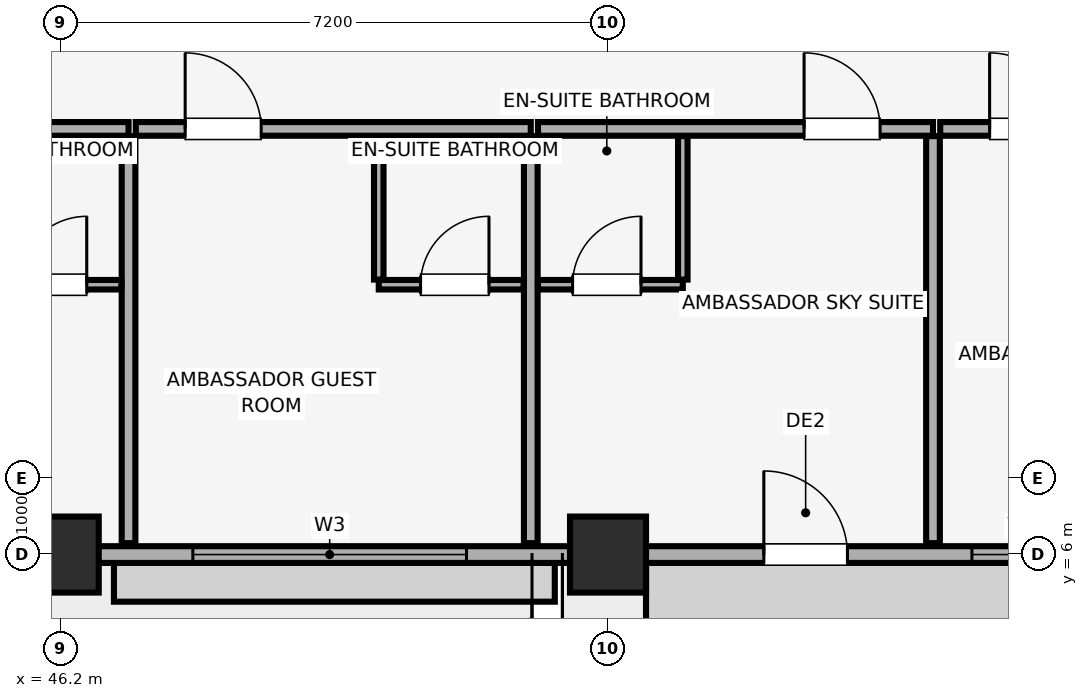
"""IFC4 building model, lengths in metres.
Left out: names, types, materials, properties, quantities, classifications, styles, units other than length and angle.
Written with IfcOpenShell. Run it as: python <this file> out.ifc"""

import sys

from ifc_helpers import new_model, si_unit, direction, frame, frame_2d, origin, origin_2d, place, context, subcontext, project, spatial, rectangle, extrude, element, fill, save


model = new_model("IFC4")
c1 = context("Model", 3, precision=1e-05, world=origin(), true_north=direction((0.0, 1.0)))
c2 = subcontext(c1, "Body", "Model", "MODEL_VIEW")
j1 = project(units=[si_unit("LENGTHUNIT", "METRE"), si_unit("PLANEANGLEUNIT", "RADIAN")], contexts=[c1])
p1 = place(None, origin())
s1 = spatial("IfcSite", under=j1, at=p1, CompositionType="ELEMENT")
p2 = place(p1, origin())
s2 = spatial("IfcBuilding", under=s1, at=p2, CompositionType="ELEMENT")
p3 = place(p2, frame((0.0, 0.0, 229.15)))
s3 = spatial("IfcBuildingStorey", under=s2, at=p3, CompositionType="ELEMENT", Elevation=229.15)
for number, where, z_axis, x_axis in (
    (1, (46.2, 6.0, 0.0), (0.0, 0.0, 1.0), (1.0, 0.0, 0.0)),
    (2, (53.4, 6.0, 0.0), (0.0, 0.0, 1.0), (1.0, 0.0, 0.0)),
):
    element("IfcColumn", number, at=place(p3, frame(where, z_axis=z_axis, x_axis=x_axis)), inside=s3, PredefinedType="COLUMN", context=c2, shape_type="SweptSolid", body=[
        extrude(rectangle(XDim=1.0, YDim=1.0, at=origin_2d()), origin(), (0.0, 0.0, 1.0), 3.71),
    ])
p4 = place(p3, frame((9.8, 6.0, 0.0), z_axis=(0.0, 0.0, 1.0), x_axis=(1.0, 0.0, 0.0)))
e3 = element("IfcWall", 3, at=p4, inside=s3, PredefinedType="SOLIDWALL", context=c2, shape_type="SweptSolid", body=[
    extrude(rectangle(XDim=64.4, YDim=0.22, at=frame_2d((32.2, 0.0))), origin(), (0.0, 0.0, 1.0), 2.91),
])
p5 = place(p4, frame((3.25, 0.0, 0.0)))
e4 = element("IfcOpeningElement", 4, at=p5, cuts=e3, PredefinedType="OPENING", context=c2, shape_type="SweptSolid", body=[
    extrude(rectangle(XDim=1.1, YDim=2.15, at=frame_2d((0.55, 1.075))), frame((0.0, 0.12, 0.0), z_axis=(0.0, -1.0, 0.0), x_axis=(1.0, 0.0, 0.0)), (0.0, 0.0, 1.0), 0.24),
])
p6 = place(p4, frame((24.45, 0.0, 0.0)))
e5 = element("IfcOpeningElement", 5, at=p6, cuts=e3, PredefinedType="OPENING", context=c2, shape_type="SweptSolid", body=[
    extrude(rectangle(XDim=1.1, YDim=2.15, at=frame_2d((0.55, 1.075))), frame((0.0, 0.12, 0.0), z_axis=(0.0, -1.0, 0.0), x_axis=(1.0, 0.0, 0.0)), (0.0, 0.0, 1.0), 0.24),
])
p7 = place(p4, frame((45.65, 0.0, 0.0)))
e6 = element("IfcOpeningElement", 6, at=p7, cuts=e3, PredefinedType="OPENING", context=c2, shape_type="SweptSolid", body=[
    extrude(rectangle(XDim=1.1, YDim=2.15, at=frame_2d((0.55, 1.075))), frame((0.0, 0.12, 0.0), z_axis=(0.0, -1.0, 0.0), x_axis=(1.0, 0.0, 0.0)), (0.0, 0.0, 1.0), 0.24),
])
p8 = place(p4, frame((0.825, 0.0, 0.85)))
e7 = element("IfcOpeningElement", 7, at=p8, cuts=e3, PredefinedType="OPENING", context=c2, shape_type="SweptSolid", body=[
    extrude(rectangle(XDim=1.5, YDim=1.4, at=frame_2d((0.75, 0.7))), frame((0.0, 0.12, 0.0), z_axis=(0.0, -1.0, 0.0), x_axis=(1.0, 0.0, 0.0)), (0.0, 0.0, 1.0), 0.24),
])
p9 = place(p4, frame((7.217, 0.0, 0.85)))
e8 = element("IfcOpeningElement", 8, at=p9, cuts=e3, PredefinedType="OPENING", context=c2, shape_type="SweptSolid", body=[
    extrude(rectangle(XDim=3.2, YDim=1.85, at=frame_2d((1.6, 0.925))), frame((0.0, 0.12, 0.0), z_axis=(0.0, -1.0, 0.0), x_axis=(1.0, 0.0, 0.0)), (0.0, 0.0, 1.0), 0.24),
])
p10 = place(p4, frame((11.267, 0.0, 0.85)))
e9 = element("IfcOpeningElement", 9, at=p10, cuts=e3, PredefinedType="OPENING", context=c2, shape_type="SweptSolid", body=[
    extrude(rectangle(XDim=1.5, YDim=1.4, at=frame_2d((0.75, 0.7))), frame((0.0, 0.12, 0.0), z_axis=(0.0, -1.0, 0.0), x_axis=(1.0, 0.0, 0.0)), (0.0, 0.0, 1.0), 0.24),
])
p11 = place(p4, frame((16.663, 0.0, 0.85)))
e10 = element("IfcOpeningElement", 10, at=p11, cuts=e3, PredefinedType="OPENING", context=c2, shape_type="SweptSolid", body=[
    extrude(rectangle(XDim=3.2, YDim=1.85, at=frame_2d((1.6, 0.925))), frame((0.0, 0.12, 0.0), z_axis=(0.0, -1.0, 0.0), x_axis=(1.0, 0.0, 0.0)), (0.0, 0.0, 1.0), 0.24),
])
p12 = place(p4, frame((22.098, 0.0, 0.85)))
e11 = element("IfcOpeningElement", 11, at=p12, cuts=e3, PredefinedType="OPENING", context=c2, shape_type="SweptSolid", body=[
    extrude(rectangle(XDim=1.5, YDim=1.4, at=frame_2d((0.75, 0.7))), frame((0.0, 0.12, 0.0), z_axis=(0.0, -1.0, 0.0), x_axis=(1.0, 0.0, 0.0)), (0.0, 0.0, 1.0), 0.24),
])
p13 = place(p4, frame((29.0, 0.0, 0.85)))
e12 = element("IfcOpeningElement", 12, at=p13, cuts=e3, PredefinedType="OPENING", context=c2, shape_type="SweptSolid", body=[
    extrude(rectangle(XDim=2.4, YDim=1.5, at=frame_2d((1.2, 0.75))), frame((0.0, 0.12, 0.0), z_axis=(0.0, -1.0, 0.0), x_axis=(1.0, 0.0, 0.0)), (0.0, 0.0, 1.0), 0.24),
])
p14 = place(p4, frame((32.4, 0.0, 0.85)))
e13 = element("IfcOpeningElement", 13, at=p14, cuts=e3, PredefinedType="OPENING", context=c2, shape_type="SweptSolid", body=[
    extrude(rectangle(XDim=3.2, YDim=1.85, at=frame_2d((1.6, 0.925))), frame((0.0, 0.12, 0.0), z_axis=(0.0, -1.0, 0.0), x_axis=(1.0, 0.0, 0.0)), (0.0, 0.0, 1.0), 0.24),
])
p15 = place(p4, frame((38.138, 0.0, 0.85)))
e14 = element("IfcOpeningElement", 14, at=p15, cuts=e3, PredefinedType="OPENING", context=c2, shape_type="SweptSolid", body=[
    extrude(rectangle(XDim=3.6, YDim=1.75, at=frame_2d((1.8, 0.875))), frame((0.0, 0.12, 0.0), z_axis=(0.0, -1.0, 0.0), x_axis=(1.0, 0.0, 0.0)), (0.0, 0.0, 1.0), 0.24),
])
p16 = place(p4, frame((48.387, 0.0, 0.85)))
e15 = element("IfcOpeningElement", 15, at=p16, cuts=e3, PredefinedType="OPENING", context=c2, shape_type="SweptSolid", body=[
    extrude(rectangle(XDim=1.5, YDim=1.4, at=frame_2d((0.75, 0.7))), frame((0.0, 0.12, 0.0), z_axis=(0.0, -1.0, 0.0), x_axis=(1.0, 0.0, 0.0)), (0.0, 0.0, 1.0), 0.24),
])
p17 = place(p4, frame((53.583, 0.0, 0.85)))
e16 = element("IfcOpeningElement", 16, at=p17, cuts=e3, PredefinedType="OPENING", context=c2, shape_type="SweptSolid", body=[
    extrude(rectangle(XDim=3.6, YDim=1.75, at=frame_2d((1.8, 0.875))), frame((0.0, 0.12, 0.0), z_axis=(0.0, -1.0, 0.0), x_axis=(1.0, 0.0, 0.0)), (0.0, 0.0, 1.0), 0.24),
])
p18 = place(p4, frame((59.695, 0.0, 0.85)))
e17 = element("IfcOpeningElement", 17, at=p18, cuts=e3, PredefinedType="OPENING", context=c2, shape_type="SweptSolid", body=[
    extrude(rectangle(XDim=3.6, YDim=1.75, at=frame_2d((1.8, 0.875))), frame((0.0, 0.12, 0.0), z_axis=(0.0, -1.0, 0.0), x_axis=(1.0, 0.0, 0.0)), (0.0, 0.0, 1.0), 0.24),
])
p19 = place(p3, frame((41.895, 11.6, 0.0), z_axis=(0.0, 0.0, 1.0), x_axis=(1.0, 0.0, 0.0)))
e18 = element("IfcWall", 18, at=p19, inside=s3, PredefinedType="PARTITIONING", context=c2, shape_type="SweptSolid", body=[
    extrude(rectangle(XDim=5.197, YDim=0.18, at=frame_2d((2.598, 0.0))), origin(), (0.0, 0.0, 1.0), 3.71),
])
p20 = place(p19, frame((0.65, 0.0, 0.0)))
e19 = element("IfcOpeningElement", 19, at=p20, cuts=e18, PredefinedType="OPENING", context=c2, shape_type="SweptSolid", body=[
    extrude(rectangle(XDim=1.0, YDim=2.15, at=frame_2d((0.5, 1.075))), frame((0.0, 0.1, 0.0), z_axis=(0.0, -1.0, 0.0), x_axis=(1.0, 0.0, 0.0)), (0.0, 0.0, 1.0), 0.2),
])
p21 = place(p3, frame((47.092, 6.15, 0.0), z_axis=(0.0, 0.0, 1.0), x_axis=(0.0, 1.0, 0.0)))
e20 = element("IfcWall", 20, at=p21, inside=s3, PredefinedType="PARTITIONING", context=c2, shape_type="SweptSolid", body=[
    extrude(rectangle(XDim=5.355, YDim=0.18, at=frame_2d((2.677, 0.0))), origin(), (0.0, 0.0, 1.0), 3.71),
])
p22 = place(p3, frame((45.092, 9.55, 0.0), z_axis=(0.0, 0.0, 1.0), x_axis=(1.0, 0.0, 0.0)))
e21 = element("IfcWall", 21, at=p22, inside=s3, PredefinedType="PARTITIONING", context=c2, shape_type="SweptSolid", body=[
    extrude(rectangle(XDim=1.905, YDim=0.125, at=frame_2d((0.953, 0.0))), origin(), (0.0, 0.0, 1.0), 3.71),
])
p23 = place(p22, frame((0.55, 0.0, 0.0)))
e22 = element("IfcOpeningElement", 22, at=p23, cuts=e21, PredefinedType="OPENING", context=c2, shape_type="SweptSolid", body=[
    extrude(rectangle(XDim=0.9, YDim=2.1, at=frame_2d((0.45, 1.05))), frame((0.0, 0.073, 0.0), z_axis=(0.0, -1.0, 0.0), x_axis=(1.0, 0.0, 0.0)), (0.0, 0.0, 1.0), 0.145),
])
p24 = place(p3, frame((47.187, 11.6, 0.0), z_axis=(0.0, 0.0, 1.0), x_axis=(1.0, 0.0, 0.0)))
e23 = element("IfcWall", 23, at=p24, inside=s3, PredefinedType="PARTITIONING", context=c2, shape_type="SweptSolid", body=[
    extrude(rectangle(XDim=5.197, YDim=0.18, at=frame_2d((2.598, 0.0))), origin(), (0.0, 0.0, 1.0), 3.71),
])
p25 = place(p24, frame((0.65, 0.0, 0.0)))
e24 = element("IfcOpeningElement", 24, at=p25, cuts=e23, PredefinedType="OPENING", context=c2, shape_type="SweptSolid", body=[
    extrude(rectangle(XDim=1.0, YDim=2.15, at=frame_2d((0.5, 1.075))), frame((0.0, 0.1, 0.0), z_axis=(0.0, -1.0, 0.0), x_axis=(1.0, 0.0, 0.0)), (0.0, 0.0, 1.0), 0.2),
])
p26 = place(p3, frame((52.384, 6.15, 0.0), z_axis=(0.0, 0.0, 1.0), x_axis=(0.0, 1.0, 0.0)))
e25 = element("IfcWall", 25, at=p26, inside=s3, PredefinedType="PARTITIONING", context=c2, shape_type="SweptSolid", body=[
    extrude(rectangle(XDim=5.355, YDim=0.18, at=frame_2d((2.677, 0.0))), origin(), (0.0, 0.0, 1.0), 3.71),
])
p27 = place(p3, frame((50.384, 9.55, 0.0), z_axis=(0.0, 0.0, 1.0), x_axis=(1.0, 0.0, 0.0)))
e26 = element("IfcWall", 26, at=p27, inside=s3, PredefinedType="PARTITIONING", context=c2, shape_type="SweptSolid", body=[
    extrude(rectangle(XDim=1.905, YDim=0.125, at=frame_2d((0.953, 0.0))), origin(), (0.0, 0.0, 1.0), 3.71),
])
p28 = place(p27, frame((0.55, 0.0, 0.0)))
e27 = element("IfcOpeningElement", 27, at=p28, cuts=e26, PredefinedType="OPENING", context=c2, shape_type="SweptSolid", body=[
    extrude(rectangle(XDim=0.9, YDim=2.1, at=frame_2d((0.45, 1.05))), frame((0.0, 0.073, 0.0), z_axis=(0.0, -1.0, 0.0), x_axis=(1.0, 0.0, 0.0)), (0.0, 0.0, 1.0), 0.145),
])
p29 = place(p3, frame((50.384, 9.617, 0.0), z_axis=(0.0, 0.0, 1.0), x_axis=(0.0, 1.0, 0.0)))
e28 = element("IfcWall", 28, at=p29, inside=s3, PredefinedType="PARTITIONING", context=c2, shape_type="SweptSolid", body=[
    extrude(rectangle(XDim=1.887, YDim=0.125, at=frame_2d((0.944, 0.0))), origin(), (0.0, 0.0, 1.0), 3.71),
])
p30 = place(p3, frame((52.479, 11.6, 0.0), z_axis=(0.0, 0.0, 1.0), x_axis=(1.0, 0.0, 0.0)))
e29 = element("IfcWall", 29, at=p30, inside=s3, PredefinedType="PARTITIONING", context=c2, shape_type="SweptSolid", body=[
    extrude(rectangle(XDim=5.197, YDim=0.18, at=frame_2d((2.598, 0.0))), origin(), (0.0, 0.0, 1.0), 3.71),
])
p31 = place(p30, frame((3.501, 0.0, 0.0)))
e30 = element("IfcOpeningElement", 30, at=p31, cuts=e29, PredefinedType="OPENING", context=c2, shape_type="SweptSolid", body=[
    extrude(rectangle(XDim=1.0, YDim=2.15, at=frame_2d((0.5, 1.075))), frame((0.0, 0.1, 0.0), z_axis=(0.0, -1.0, 0.0), x_axis=(1.0, 0.0, 0.0)), (0.0, 0.0, 1.0), 0.2),
])
p32 = place(p3, frame((57.676, 6.15, 0.0), z_axis=(0.0, 0.0, 1.0), x_axis=(0.0, 1.0, 0.0)))
e31 = element("IfcWall", 31, at=p32, inside=s3, PredefinedType="PARTITIONING", context=c2, shape_type="SweptSolid", body=[
    extrude(rectangle(XDim=5.355, YDim=0.18, at=frame_2d((2.677, 0.0))), origin(), (0.0, 0.0, 1.0), 3.71),
])
p33 = place(p3, frame((52.479, 9.55, 0.0), z_axis=(0.0, 0.0, 1.0), x_axis=(1.0, 0.0, 0.0)))
e32 = element("IfcWall", 32, at=p33, inside=s3, PredefinedType="PARTITIONING", context=c2, shape_type="SweptSolid", body=[
    extrude(rectangle(XDim=1.905, YDim=0.125, at=frame_2d((0.953, 0.0))), origin(), (0.0, 0.0, 1.0), 3.71),
])
p34 = place(p33, frame((0.455, 0.0, 0.0)))
e33 = element("IfcOpeningElement", 33, at=p34, cuts=e32, PredefinedType="OPENING", context=c2, shape_type="SweptSolid", body=[
    extrude(rectangle(XDim=0.9, YDim=2.1, at=frame_2d((0.45, 1.05))), frame((0.0, 0.073, 0.0), z_axis=(0.0, -1.0, 0.0), x_axis=(1.0, 0.0, 0.0)), (0.0, 0.0, 1.0), 0.145),
])
p35 = place(p3, frame((54.384, 9.617, 0.0), z_axis=(0.0, 0.0, 1.0), x_axis=(0.0, 1.0, 0.0)))
e34 = element("IfcWall", 34, at=p35, inside=s3, PredefinedType="PARTITIONING", context=c2, shape_type="SweptSolid", body=[
    extrude(rectangle(XDim=1.887, YDim=0.125, at=frame_2d((0.944, 0.0))), origin(), (0.0, 0.0, 1.0), 3.71),
])
p36 = place(p3, frame((57.771, 11.6, 0.0), z_axis=(0.0, 0.0, 1.0), x_axis=(1.0, 0.0, 0.0)))
e35 = element("IfcWall", 35, at=p36, inside=s3, PredefinedType="PARTITIONING", context=c2, shape_type="SweptSolid", body=[
    extrude(rectangle(XDim=5.197, YDim=0.18, at=frame_2d((2.598, 0.0))), origin(), (0.0, 0.0, 1.0), 3.71),
])
p37 = place(p36, frame((0.65, 0.0, 0.0)))
e36 = element("IfcOpeningElement", 36, at=p37, cuts=e35, PredefinedType="OPENING", context=c2, shape_type="SweptSolid", body=[
    extrude(rectangle(XDim=1.0, YDim=2.15, at=frame_2d((0.5, 1.075))), frame((0.0, 0.1, 0.0), z_axis=(0.0, -1.0, 0.0), x_axis=(1.0, 0.0, 0.0)), (0.0, 0.0, 1.0), 0.2),
])
p38 = place(p7, origin())
e37 = element("IfcDoor", 37, at=p38, inside=s3, OperationType="SINGLE_SWING_LEFT", PredefinedType="DOOR", context=c2, shape_type="SweptSolid", body=[
    extrude(rectangle(XDim=1.1, YDim=2.15, at=frame_2d((0.55, 1.075))), frame((0.0, 0.025, 0.0), z_axis=(0.0, -1.0, 0.0), x_axis=(1.0, 0.0, 0.0)), (0.0, 0.0, 1.0), 0.05),
])
fill(e6, e37)
p39 = place(p15, origin())
e38 = element("IfcWindow", 38, at=p39, inside=s3, PartitioningType="SINGLE_PANEL", PredefinedType="WINDOW", context=c2, shape_type="SweptSolid", body=[
    extrude(rectangle(XDim=3.6, YDim=1.75, at=frame_2d((1.8, 0.875))), frame((0.0, 0.03, 0.0), z_axis=(0.0, -1.0, 0.0), x_axis=(1.0, 0.0, 0.0)), (0.0, 0.0, 1.0), 0.06),
])
fill(e14, e38)
p40 = place(p16, origin())
e39 = element("IfcWindow", 39, at=p40, inside=s3, PartitioningType="SINGLE_PANEL", PredefinedType="WINDOW", context=c2, shape_type="SweptSolid", body=[
    extrude(rectangle(XDim=1.5, YDim=1.4, at=frame_2d((0.75, 0.7))), frame((0.0, 0.03, 0.0), z_axis=(0.0, -1.0, 0.0), x_axis=(1.0, 0.0, 0.0)), (0.0, 0.0, 1.0), 0.06),
])
fill(e15, e39)
p41 = place(p23, origin())
e40 = element("IfcDoor", 40, at=p41, inside=s3, OperationType="SINGLE_SWING_RIGHT", PredefinedType="DOOR", context=c2, shape_type="SweptSolid", body=[
    extrude(rectangle(XDim=0.9, YDim=2.1, at=frame_2d((0.45, 1.05))), frame((0.0, 0.025, 0.0), z_axis=(0.0, -1.0, 0.0), x_axis=(1.0, 0.0, 0.0)), (0.0, 0.0, 1.0), 0.05),
])
fill(e22, e40)
p42 = place(p25, origin())
e41 = element("IfcDoor", 41, at=p42, inside=s3, OperationType="SINGLE_SWING_LEFT", PredefinedType="DOOR", context=c2, shape_type="SweptSolid", body=[
    extrude(rectangle(XDim=1.0, YDim=2.15, at=frame_2d((0.5, 1.075))), frame((0.0, 0.025, 0.0), z_axis=(0.0, -1.0, 0.0), x_axis=(1.0, 0.0, 0.0)), (0.0, 0.0, 1.0), 0.05),
])
fill(e24, e41)
p43 = place(p28, origin())
e42 = element("IfcDoor", 42, at=p43, inside=s3, OperationType="SINGLE_SWING_RIGHT", PredefinedType="DOOR", context=c2, shape_type="SweptSolid", body=[
    extrude(rectangle(XDim=0.9, YDim=2.1, at=frame_2d((0.45, 1.05))), frame((0.0, 0.025, 0.0), z_axis=(0.0, -1.0, 0.0), x_axis=(1.0, 0.0, 0.0)), (0.0, 0.0, 1.0), 0.05),
])
fill(e27, e42)
p44 = place(p31, origin())
e43 = element("IfcDoor", 43, at=p44, inside=s3, OperationType="SINGLE_SWING_LEFT", PredefinedType="DOOR", context=c2, shape_type="SweptSolid", body=[
    extrude(rectangle(XDim=1.0, YDim=2.15, at=frame_2d((0.5, 1.075))), frame((0.0, 0.025, 0.0), z_axis=(0.0, -1.0, 0.0), x_axis=(1.0, 0.0, 0.0)), (0.0, 0.0, 1.0), 0.05),
])
fill(e30, e43)
p45 = place(p34, origin())
e44 = element("IfcDoor", 44, at=p45, inside=s3, OperationType="SINGLE_SWING_RIGHT", PredefinedType="DOOR", context=c2, shape_type="SweptSolid", body=[
    extrude(rectangle(XDim=0.9, YDim=2.1, at=frame_2d((0.45, 1.05))), frame((0.0, 0.025, 0.0), z_axis=(0.0, -1.0, 0.0), x_axis=(1.0, 0.0, 0.0)), (0.0, 0.0, 1.0), 0.05),
])
fill(e33, e44)
p46 = place(p37, origin())
e45 = element("IfcDoor", 45, at=p46, inside=s3, OperationType="SINGLE_SWING_LEFT", PredefinedType="DOOR", context=c2, shape_type="SweptSolid", body=[
    extrude(rectangle(XDim=1.0, YDim=2.15, at=frame_2d((0.5, 1.075))), frame((0.0, 0.025, 0.0), z_axis=(0.0, -1.0, 0.0), x_axis=(1.0, 0.0, 0.0)), (0.0, 0.0, 1.0), 0.05),
])
fill(e36, e45)
save(model, sys.argv[1])
